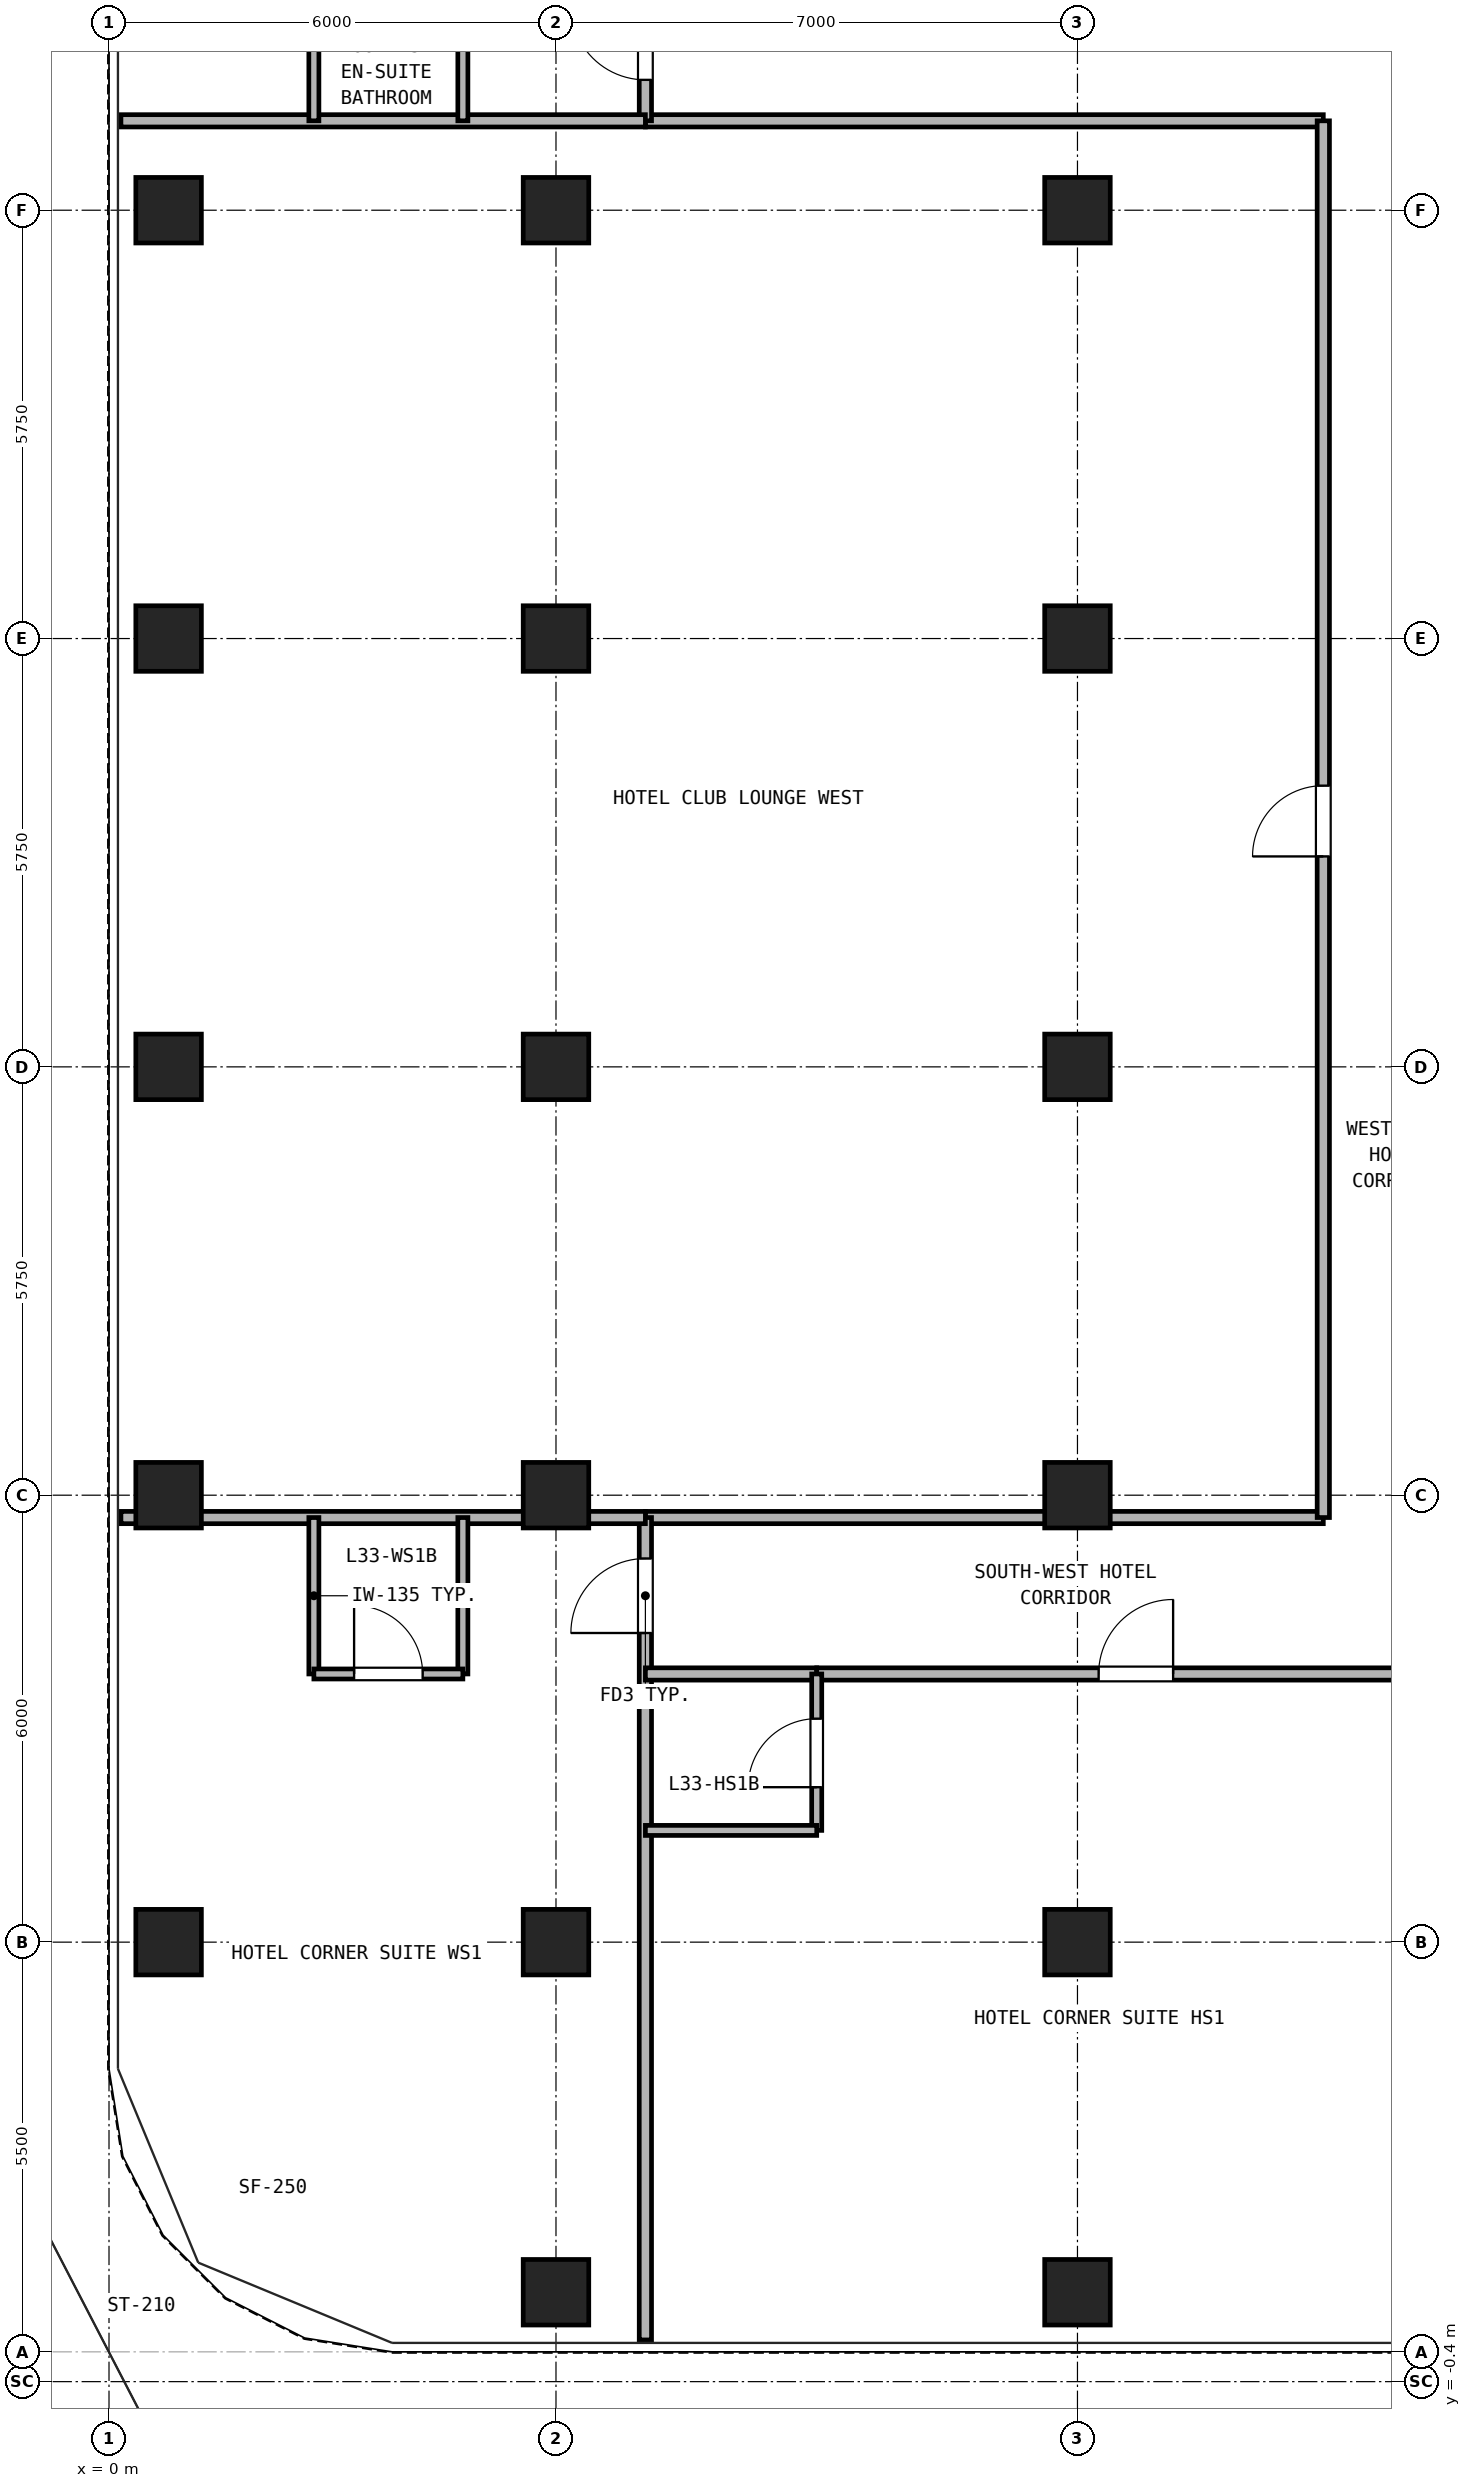
"""IFC4 building model, lengths in metres.
Left out: names, types, materials, properties, quantities, classifications, styles, units other than length and angle.
Written with IfcOpenShell. Run it as: python <this file> out.ifc"""

import sys

from ifc_helpers import new_model, si_unit, direction, frame, frame_2d, origin, origin_2d, place, context, subcontext, project, spatial, rectangle, hollow_rectangle, extrude, source, transform, mapped, element, fill, save


model = new_model("IFC4")
c1 = context("Model", 3, precision=1e-05, world=origin(), true_north=direction((0.0, 1.0)))
c2 = subcontext(c1, "Body", "Model", "MODEL_VIEW")
j1 = project(units=[si_unit("LENGTHUNIT", "METRE"), si_unit("PLANEANGLEUNIT", "RADIAN")], contexts=[c1])
p1 = place(None, origin())
s1 = spatial("IfcSite", under=j1, at=p1, CompositionType="ELEMENT")
p2 = place(p1, origin())
s2 = spatial("IfcBuilding", under=s1, at=p2, CompositionType="ELEMENT")
p3 = place(p2, frame((0.0, 0.0, 121.5)))
s3 = spatial("IfcBuildingStorey", under=s2, at=p3, CompositionType="ELEMENT", Elevation=121.5)
m1 = source(origin(), c2, "Body", "SweptSolid", [
    extrude(hollow_rectangle(XDim=0.88, YDim=0.88, WallThickness=0.05, at=origin_2d()), origin(), (0.0, 0.0, 1.0), 2.95),
])
for number, where, z_axis, x_axis in (
    (1, (6.0, 0.8, 0.0), (0.0, 0.0, 1.0), (1.0, 0.0, 0.0)),
    (2, (13.0, 0.8, 0.0), (0.0, 0.0, 1.0), (1.0, 0.0, 0.0)),
    (3, (0.8, 5.5, 0.0), (0.0, 0.0, 1.0), (1.0, 0.0, 0.0)),
    (4, (0.8, 11.5, 0.0), (0.0, 0.0, 1.0), (1.0, 0.0, 0.0)),
    (5, (0.8, 17.25, 0.0), (0.0, 0.0, 1.0), (1.0, 0.0, 0.0)),
    (6, (0.8, 23.0, 0.0), (0.0, 0.0, 1.0), (1.0, 0.0, 0.0)),
    (7, (0.8, 28.75, 0.0), (0.0, 0.0, 1.0), (1.0, 0.0, 0.0)),
    (8, (6.0, 5.5, 0.0), (0.0, 0.0, 1.0), (1.0, 0.0, 0.0)),
    (9, (6.0, 11.5, 0.0), (0.0, 0.0, 1.0), (1.0, 0.0, 0.0)),
    (10, (6.0, 17.25, 0.0), (0.0, 0.0, 1.0), (1.0, 0.0, 0.0)),
    (11, (6.0, 23.0, 0.0), (0.0, 0.0, 1.0), (1.0, 0.0, 0.0)),
    (12, (6.0, 28.75, 0.0), (0.0, 0.0, 1.0), (1.0, 0.0, 0.0)),
    (13, (13.0, 5.5, 0.0), (0.0, 0.0, 1.0), (1.0, 0.0, 0.0)),
    (14, (13.0, 11.5, 0.0), (0.0, 0.0, 1.0), (1.0, 0.0, 0.0)),
    (15, (13.0, 17.25, 0.0), (0.0, 0.0, 1.0), (1.0, 0.0, 0.0)),
    (16, (13.0, 23.0, 0.0), (0.0, 0.0, 1.0), (1.0, 0.0, 0.0)),
    (17, (13.0, 28.75, 0.0), (0.0, 0.0, 1.0), (1.0, 0.0, 0.0)),
):
    element("IfcColumn", number, at=place(p3, frame(where, z_axis=z_axis, x_axis=x_axis)), inside=s3, PredefinedType="COLUMN", context=c2, shape_type="MappedRepresentation", body=[
        mapped(m1, transform((0.0, 0.0, 0.0), x_axis=(1.0, 0.0, 0.0), y_axis=(0.0, 1.0, 0.0), z_axis=(0.0, 0.0, 1.0), scale=1.0)),
    ])
for number, where, z_axis, x_axis in (
    (18, (7.2, 11.2, 0.0), (0.0, 0.0, 1.0), (1.0, 0.0, 0.0)),
    (19, (7.2, 29.95, 0.0), (0.0, 0.0, 1.0), (1.0, 0.0, 0.0)),
):
    element("IfcWall", number, at=place(p3, frame(where, z_axis=z_axis, x_axis=x_axis)), inside=s3, PredefinedType="PARTITIONING", context=c2, shape_type="SweptSolid", body=[
        extrude(rectangle(XDim=9.1, YDim=0.165, at=frame_2d((4.55, 0.0))), origin(), (0.0, 0.0, 1.0), 2.95),
    ])
p4 = place(p3, frame((16.3, 11.2, 0.0), z_axis=(0.0, 0.0, 1.0), x_axis=(0.0, 1.0, 0.0)))
e20 = element("IfcWall", 20, at=p4, inside=s3, PredefinedType="PARTITIONING", context=c2, shape_type="SweptSolid", body=[
    extrude(rectangle(XDim=18.75, YDim=0.165, at=frame_2d((9.375, 0.0))), origin(), (0.0, 0.0, 1.0), 2.95),
])
p5 = place(p4, frame((8.875, 0.0, 0.0)))
e21 = element("IfcOpeningElement", 21, at=p5, cuts=e20, PredefinedType="OPENING", context=c2, shape_type="SweptSolid", body=[
    extrude(rectangle(XDim=0.95, YDim=2.15, at=frame_2d((0.475, 1.075))), frame((0.0, 0.093, 0.0), z_axis=(0.0, -1.0, 0.0), x_axis=(1.0, 0.0, 0.0)), (0.0, 0.0, 1.0), 0.185),
])
p6 = place(p3, frame((7.2, 0.16, 0.0), z_axis=(0.0, 0.0, 1.0), x_axis=(0.0, 1.0, 0.0)))
e22 = element("IfcWall", 22, at=p6, inside=s3, PredefinedType="PARTITIONING", context=c2, shape_type="SweptSolid", body=[
    extrude(rectangle(XDim=11.04, YDim=0.165, at=frame_2d((5.52, 0.0))), origin(), (0.0, 0.0, 1.0), 2.95),
])
p7 = place(p6, frame((9.49, 0.0, 0.0)))
e23 = element("IfcOpeningElement", 23, at=p7, cuts=e22, PredefinedType="OPENING", context=c2, shape_type="SweptSolid", body=[
    extrude(rectangle(XDim=1.0, YDim=2.15, at=frame_2d((0.5, 1.075))), frame((0.0, 0.093, 0.0), z_axis=(0.0, -1.0, 0.0), x_axis=(1.0, 0.0, 0.0)), (0.0, 0.0, 1.0), 0.185),
])
p8 = place(p3, frame((7.2, 29.95, 0.0), z_axis=(0.0, 0.0, 1.0), x_axis=(0.0, 1.0, 0.0)))
e24 = element("IfcWall", 24, at=p8, inside=s3, PredefinedType="PARTITIONING", context=c2, shape_type="SweptSolid", body=[
    extrude(rectangle(XDim=5.19, YDim=0.165, at=frame_2d((2.595, 0.0))), origin(), (0.0, 0.0, 1.0), 2.95),
])
p9 = place(p8, frame((0.55, 0.0, 0.0)))
e25 = element("IfcOpeningElement", 25, at=p9, cuts=e24, PredefinedType="OPENING", context=c2, shape_type="SweptSolid", body=[
    extrude(rectangle(XDim=1.0, YDim=2.15, at=frame_2d((0.5, 1.075))), frame((0.0, 0.093, 0.0), z_axis=(0.0, -1.0, 0.0), x_axis=(1.0, 0.0, 0.0)), (0.0, 0.0, 1.0), 0.185),
])
for number, where, z_axis, x_axis in (
    (26, (0.16, 11.2, 0.0), (0.0, 0.0, 1.0), (1.0, 0.0, 0.0)),
    (27, (0.16, 29.95, 0.0), (0.0, 0.0, 1.0), (1.0, 0.0, 0.0)),
):
    element("IfcWall", number, at=place(p3, frame(where, z_axis=z_axis, x_axis=x_axis)), inside=s3, PredefinedType="PARTITIONING", context=c2, shape_type="SweptSolid", body=[
        extrude(rectangle(XDim=7.04, YDim=0.165, at=frame_2d((3.52, 0.0))), origin(), (0.0, 0.0, 1.0), 2.95),
    ])
for number, where, z_axis, x_axis in (
    (28, (2.75, 9.1, 0.0), (0.0, 0.0, 1.0), (0.0, 1.0, 0.0)),
    (29, (4.75, 9.1, 0.0), (0.0, 0.0, 1.0), (0.0, 1.0, 0.0)),
):
    element("IfcWall", number, at=place(p3, frame(where, z_axis=z_axis, x_axis=x_axis)), inside=s3, PredefinedType="PARTITIONING", context=c2, shape_type="SweptSolid", body=[
        extrude(rectangle(XDim=2.1, YDim=0.135, at=frame_2d((1.05, 0.0))), origin(), (0.0, 0.0, 1.0), 2.95),
    ])
p10 = place(p3, frame((2.75, 9.1, 0.0), z_axis=(0.0, 0.0, 1.0), x_axis=(1.0, 0.0, 0.0)))
e30 = element("IfcWall", 30, at=p10, inside=s3, PredefinedType="PARTITIONING", context=c2, shape_type="SweptSolid", body=[
    extrude(rectangle(XDim=2.0, YDim=0.135, at=frame_2d((1.0, 0.0))), origin(), (0.0, 0.0, 1.0), 2.95),
])
p11 = place(p10, frame((0.54, 0.0, 0.0)))
e31 = element("IfcOpeningElement", 31, at=p11, cuts=e30, PredefinedType="OPENING", context=c2, shape_type="SweptSolid", body=[
    extrude(rectangle(XDim=0.92, YDim=2.1, at=frame_2d((0.46, 1.05))), frame((0.0, 0.077, 0.0), z_axis=(0.0, -1.0, 0.0), x_axis=(1.0, 0.0, 0.0)), (0.0, 0.0, 1.0), 0.155),
])
for number, where, z_axis, x_axis in (
    (32, (2.75, 29.95, 0.0), (0.0, 0.0, 1.0), (0.0, 1.0, 0.0)),
    (33, (4.75, 29.95, 0.0), (0.0, 0.0, 1.0), (0.0, 1.0, 0.0)),
):
    element("IfcWall", number, at=place(p3, frame(where, z_axis=z_axis, x_axis=x_axis)), inside=s3, PredefinedType="PARTITIONING", context=c2, shape_type="SweptSolid", body=[
        extrude(rectangle(XDim=2.1, YDim=0.135, at=frame_2d((1.05, 0.0))), origin(), (0.0, 0.0, 1.0), 2.95),
    ])
p12 = place(p3, frame((7.2, 9.1, 0.0), z_axis=(0.0, 0.0, 1.0), x_axis=(1.0, 0.0, 0.0)))
e34 = element("IfcWall", 34, at=p12, inside=s3, PredefinedType="PARTITIONING", context=c2, shape_type="SweptSolid", body=[
    extrude(rectangle(XDim=2.3, YDim=0.165, at=frame_2d((1.15, 0.0))), origin(), (0.0, 0.0, 1.0), 2.95),
])
p13 = place(p3, frame((9.5, 9.1, 0.0), z_axis=(0.0, 0.0, 1.0), x_axis=(1.0, 0.0, 0.0)))
e35 = element("IfcWall", 35, at=p13, inside=s3, PredefinedType="PARTITIONING", context=c2, shape_type="SweptSolid", body=[
    extrude(rectangle(XDim=8.567, YDim=0.165, at=frame_2d((4.283, 0.0))), origin(), (0.0, 0.0, 1.0), 2.95),
])
p14 = place(p13, frame((3.784, 0.0, 0.0)))
e36 = element("IfcOpeningElement", 36, at=p14, cuts=e35, PredefinedType="OPENING", context=c2, shape_type="SweptSolid", body=[
    extrude(rectangle(XDim=1.0, YDim=2.15, at=frame_2d((0.5, 1.075))), frame((0.0, 0.093, 0.0), z_axis=(0.0, -1.0, 0.0), x_axis=(1.0, 0.0, 0.0)), (0.0, 0.0, 1.0), 0.185),
])
p15 = place(p3, frame((9.5, 7.0, 0.0), z_axis=(0.0, 0.0, 1.0), x_axis=(0.0, 1.0, 0.0)))
e37 = element("IfcWall", 37, at=p15, inside=s3, PredefinedType="PARTITIONING", context=c2, shape_type="SweptSolid", body=[
    extrude(rectangle(XDim=2.1, YDim=0.135, at=frame_2d((1.05, 0.0))), origin(), (0.0, 0.0, 1.0), 2.95),
])
p16 = place(p15, frame((0.58, 0.0, 0.0)))
e38 = element("IfcOpeningElement", 38, at=p16, cuts=e37, PredefinedType="OPENING", context=c2, shape_type="SweptSolid", body=[
    extrude(rectangle(XDim=0.92, YDim=2.1, at=frame_2d((0.46, 1.05))), frame((0.0, 0.077, 0.0), z_axis=(0.0, -1.0, 0.0), x_axis=(1.0, 0.0, 0.0)), (0.0, 0.0, 1.0), 0.155),
])
p17 = place(p3, frame((7.2, 7.0, 0.0), z_axis=(0.0, 0.0, 1.0), x_axis=(1.0, 0.0, 0.0)))
e39 = element("IfcWall", 39, at=p17, inside=s3, PredefinedType="PARTITIONING", context=c2, shape_type="SweptSolid", body=[
    extrude(rectangle(XDim=2.3, YDim=0.135, at=frame_2d((1.15, 0.0))), origin(), (0.0, 0.0, 1.0), 2.95),
])
p18 = place(p11, origin())
e40 = element("IfcDoor", 40, at=p18, inside=s3, OperationType="SINGLE_SWING_LEFT", PredefinedType="DOOR", context=c2, shape_type="SweptSolid", body=[
    extrude(rectangle(XDim=0.92, YDim=2.1, at=frame_2d((0.46, 1.05))), frame((0.0, 0.025, 0.0), z_axis=(0.0, -1.0, 0.0), x_axis=(1.0, 0.0, 0.0)), (0.0, 0.0, 1.0), 0.05),
])
fill(e31, e40)
p19 = place(p7, origin())
e41 = element("IfcDoor", 41, at=p19, inside=s3, OperationType="SINGLE_SWING_LEFT", PredefinedType="DOOR", context=c2, shape_type="SweptSolid", body=[
    extrude(rectangle(XDim=1.0, YDim=2.15, at=frame_2d((0.5, 1.075))), frame((0.0, 0.025, 0.0), z_axis=(0.0, -1.0, 0.0), x_axis=(1.0, 0.0, 0.0)), (0.0, 0.0, 1.0), 0.05),
])
fill(e23, e41)
p20 = place(p9, origin())
e42 = element("IfcDoor", 42, at=p20, inside=s3, OperationType="SINGLE_SWING_RIGHT", PredefinedType="DOOR", context=c2, shape_type="SweptSolid", body=[
    extrude(rectangle(XDim=1.0, YDim=2.15, at=frame_2d((0.5, 1.075))), frame((0.0, 0.025, 0.0), z_axis=(0.0, -1.0, 0.0), x_axis=(1.0, 0.0, 0.0)), (0.0, 0.0, 1.0), 0.05),
])
fill(e25, e42)
p21 = place(p16, frame((0.92, 0.0, 0.0), z_axis=(0.0, 0.0, 1.0), x_axis=(-1.0, 0.0, 0.0)))
e43 = element("IfcDoor", 43, at=p21, inside=s3, OperationType="SINGLE_SWING_LEFT", PredefinedType="DOOR", context=c2, shape_type="SweptSolid", body=[
    extrude(rectangle(XDim=0.92, YDim=2.1, at=frame_2d((0.46, 1.05))), frame((0.0, 0.025, 0.0), z_axis=(0.0, -1.0, 0.0), x_axis=(1.0, 0.0, 0.0)), (0.0, 0.0, 1.0), 0.05),
])
fill(e38, e43)
p22 = place(p14, frame((1.0, 0.0, 0.0), z_axis=(0.0, 0.0, 1.0), x_axis=(-1.0, 0.0, 0.0)))
e44 = element("IfcDoor", 44, at=p22, inside=s3, OperationType="SINGLE_SWING_RIGHT", PredefinedType="DOOR", context=c2, shape_type="SweptSolid", body=[
    extrude(rectangle(XDim=1.0, YDim=2.15, at=frame_2d((0.5, 1.075))), frame((0.0, 0.025, 0.0), z_axis=(0.0, -1.0, 0.0), x_axis=(1.0, 0.0, 0.0)), (0.0, 0.0, 1.0), 0.05),
])
fill(e36, e44)
p23 = place(p5, frame((0.95, 0.0, 0.0), z_axis=(0.0, 0.0, 1.0), x_axis=(-1.0, 0.0, 0.0)))
e45 = element("IfcDoor", 45, at=p23, inside=s3, OperationType="SINGLE_SWING_LEFT", PredefinedType="DOOR", context=c2, shape_type="SweptSolid", body=[
    extrude(rectangle(XDim=0.95, YDim=2.15, at=frame_2d((0.475, 1.075))), frame((0.0, 0.025, 0.0), z_axis=(0.0, -1.0, 0.0), x_axis=(1.0, 0.0, 0.0)), (0.0, 0.0, 1.0), 0.05),
])
fill(e21, e45)
save(model, sys.argv[1])
